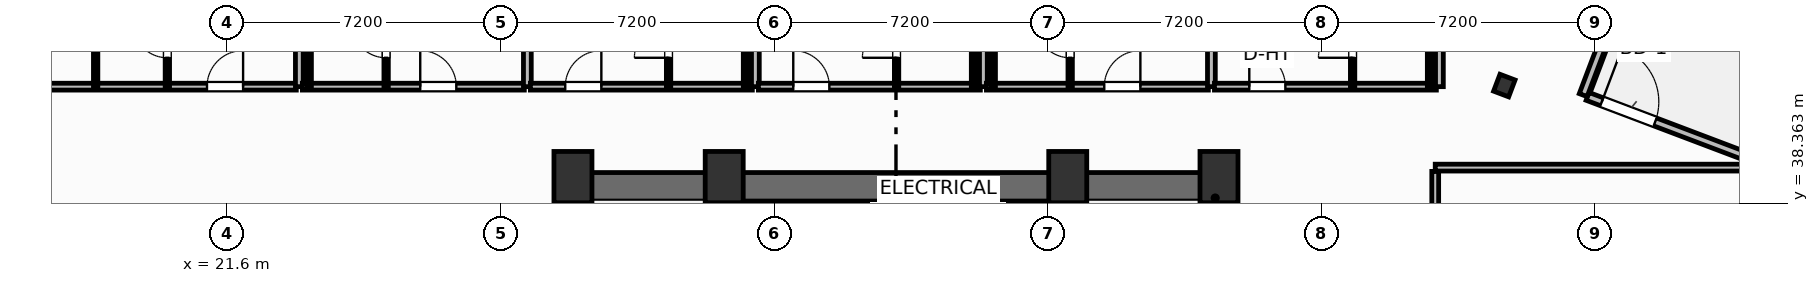
"""IFC4 building model, lengths in metres.
Left out: names, types, materials, properties, quantities, classifications, styles, units other than length and angle.
Written with IfcOpenShell. Run it as: python <this file> out.ifc"""

import sys

from ifc_helpers import new_model, si_unit, direction, frame, frame_2d, origin, origin_2d, place, context, subcontext, project, spatial, rectangle, i_section, extrude, element, fill, save


model = new_model("IFC4")
c1 = context("Model", 3, precision=1e-05, world=origin(), true_north=direction((0.0, 1.0)))
c2 = subcontext(c1, "Body", "Model", "MODEL_VIEW")
j1 = project(units=[si_unit("LENGTHUNIT", "METRE"), si_unit("PLANEANGLEUNIT", "RADIAN")], contexts=[c1])
p1 = place(None, origin())
s1 = spatial("IfcSite", under=j1, at=p1, CompositionType="ELEMENT")
p2 = place(p1, origin())
s2 = spatial("IfcBuilding", under=s1, at=p2, CompositionType="ELEMENT")
p3 = place(p2, frame((0.0, 0.0, 94.7)))
s3 = spatial("IfcBuildingStorey", under=s2, at=p3, CompositionType="ELEMENT", Elevation=94.7)
for number, where, z_axis, x_axis in (
    (1, (30.7, 39.05, 0.0), (0.0, 0.0, 1.0), (1.0, 0.0, 0.0)),
    (2, (34.68, 39.05, 0.0), (0.0, 0.0, 1.0), (1.0, 0.0, 0.0)),
    (3, (43.72, 39.05, 0.0), (0.0, 0.0, 1.0), (1.0, 0.0, 0.0)),
    (4, (47.7, 39.05, 0.0), (0.0, 0.0, 1.0), (1.0, 0.0, 0.0)),
):
    element("IfcColumn", number, at=place(p3, frame(where, z_axis=z_axis, x_axis=x_axis)), inside=s3, PredefinedType="COLUMN", context=c2, shape_type="SweptSolid", body=[
        extrude(rectangle(XDim=1.0, YDim=1.35, at=origin_2d()), origin(), (0.0, 0.0, 1.0), 3.7),
    ])
p4 = place(p3, frame((30.38, 38.795, 0.0), z_axis=(0.0, 0.0, 1.0), x_axis=(1.0, 0.0, 0.0)))
e5 = element("IfcWall", 5, at=p4, inside=s3, PredefinedType="SHEAR", context=c2, shape_type="SweptSolid", body=[
    extrude(rectangle(XDim=17.64, YDim=0.75, at=frame_2d((8.82, 0.0))), origin(), (0.0, 0.0, 1.0), 3.45),
])
for number, where, z_axis, x_axis in (
    (6, (30.755, 29.2, 0.0), (0.0, 0.0, 1.0), (0.0, 1.0, 0.0)),
    (7, (47.645, 29.2, 0.0), (0.0, 0.0, 1.0), (0.0, 1.0, 0.0)),
):
    element("IfcWall", number, at=place(p3, frame(where, z_axis=z_axis, x_axis=x_axis)), inside=s3, PredefinedType="SHEAR", context=c2, shape_type="SweptSolid", body=[
        extrude(rectangle(XDim=9.22, YDim=0.75, at=frame_2d((4.61, 0.0))), origin(), (0.0, 0.0, 1.0), 3.45),
    ])
p5 = place(p3, frame((34.64, 29.2, 0.0), z_axis=(0.0, 0.0, 1.0), x_axis=(0.0, 1.0, 0.0)))
e8 = element("IfcWall", 8, at=p5, inside=s3, PredefinedType="SHEAR", context=c2, shape_type="SweptSolid", body=[
    extrude(rectangle(XDim=9.22, YDim=0.25, at=frame_2d((4.61, 0.0))), origin(), (0.0, 0.0, 1.0), 3.45),
])
p6 = place(p5, frame((0.65, 0.0, 0.0)))
e9 = element("IfcOpeningElement", 9, at=p6, cuts=e8, PredefinedType="OPENING", context=c2, shape_type="SweptSolid", body=[
    extrude(rectangle(XDim=1.05, YDim=2.15, at=frame_2d((0.525, 1.075))), frame((0.0, 0.135, 0.0), z_axis=(0.0, -1.0, 0.0), x_axis=(1.0, 0.0, 0.0)), (0.0, 0.0, 1.0), 0.27),
])
p7 = place(p3, frame((43.76, 29.2, 0.0), z_axis=(0.0, 0.0, 1.0), x_axis=(0.0, 1.0, 0.0)))
e10 = element("IfcWall", 10, at=p7, inside=s3, PredefinedType="SHEAR", context=c2, shape_type="SweptSolid", body=[
    extrude(rectangle(XDim=9.22, YDim=0.25, at=frame_2d((4.61, 0.0))), origin(), (0.0, 0.0, 1.0), 3.45),
])
p8 = place(p7, frame((0.65, 0.0, 0.0)))
e11 = element("IfcOpeningElement", 11, at=p8, cuts=e10, PredefinedType="OPENING", context=c2, shape_type="SweptSolid", body=[
    extrude(rectangle(XDim=1.05, YDim=2.15, at=frame_2d((0.525, 1.075))), frame((0.0, 0.135, 0.0), z_axis=(0.0, -1.0, 0.0), x_axis=(1.0, 0.0, 0.0)), (0.0, 0.0, 1.0), 0.27),
])
p9 = place(p3, frame((55.208, 41.459, 0.0), z_axis=(0.0, 0.0, 1.0), x_axis=(0.935221751401, -0.354062530786, 0.0)))
e12 = element("IfcColumn", 12, at=p9, inside=s3, PredefinedType="COLUMN", context=c2, shape_type="SweptSolid", body=[
    extrude(i_section(OverallWidth=0.424, OverallDepth=0.474, WebThickness=0.048, FlangeThickness=0.077, FilletRadius=0.025, at=origin_2d()), origin(), (0.0, 0.0, 1.0), 3.7),
])
p10 = place(p3, frame((57.399, 41.175, 0.0), z_axis=(0.0, 0.0, 1.0), x_axis=(0.935227640088, -0.354046976001, 0.0)))
e13 = element("IfcWall", 13, at=p10, inside=s3, PredefinedType="SOLIDWALL", context=c2, shape_type="SweptSolid", body=[
    extrude(rectangle(XDim=6.0, YDim=0.22, at=frame_2d((3.0, 0.0))), origin(), (0.0, 0.0, 1.0), 2.73),
])
p11 = place(p10, frame((0.4, 0.0, 0.0)))
e14 = element("IfcOpeningElement", 14, at=p11, cuts=e13, PredefinedType="OPENING", context=c2, shape_type="SweptSolid", body=[
    extrude(rectangle(XDim=1.5, YDim=2.25, at=frame_2d((0.75, 1.125))), frame((0.0, 0.12, 0.0), z_axis=(0.0, -1.0, 0.0), x_axis=(1.0, 0.0, 0.0)), (0.0, 0.0, 1.0), 0.24),
])
p12 = place(p3, frame((57.284, 41.208, 0.0), z_axis=(0.0, 0.0, 1.0), x_axis=(0.354128469405, 0.935196785258, 0.0)))
e15 = element("IfcWall", 15, at=p12, inside=s3, PredefinedType="SOLIDWALL", context=c2, shape_type="SweptSolid", body=[
    extrude(rectangle(XDim=2.1, YDim=0.22, at=frame_2d((1.05, 0.0))), origin(), (0.0, 0.0, 1.0), 2.73),
])
p13 = place(p3, frame((5.506, 41.43, 0.0), z_axis=(0.0, 0.0, 1.0), x_axis=(1.0, 0.0, 0.0)))
e16 = element("IfcWall", 16, at=p13, inside=s3, PredefinedType="PARTITIONING", context=c2, shape_type="SweptSolid", body=[
    extrude(rectangle(XDim=17.914, YDim=0.18, at=frame_2d((8.957, 0.0))), origin(), (0.0, 0.0, 1.0), 3.45),
])
p14 = place(p13, frame((15.564, 0.0, 0.0)))
e17 = element("IfcOpeningElement", 17, at=p14, cuts=e16, PredefinedType="OPENING", context=c2, shape_type="SweptSolid", body=[
    extrude(rectangle(XDim=0.95, YDim=2.15, at=frame_2d((0.475, 1.075))), frame((0.0, 0.1, 0.0), z_axis=(0.0, -1.0, 0.0), x_axis=(1.0, 0.0, 0.0)), (0.0, 0.0, 1.0), 0.2),
])
p15 = place(p3, frame((20.027, 41.43, 0.0), z_axis=(0.0, 0.0, 1.0), x_axis=(0.0, 1.0, 0.0)))
e18 = element("IfcWall", 18, at=p15, inside=s3, PredefinedType="PARTITIONING", context=c2, shape_type="SweptSolid", body=[
    extrude(rectangle(XDim=2.52, YDim=0.115, at=frame_2d((1.26, 0.0))), origin(), (0.0, 0.0, 1.0), 3.45),
])
p16 = place(p15, frame((0.76, 0.0, 0.0)))
e19 = element("IfcOpeningElement", 19, at=p16, cuts=e18, PredefinedType="OPENING", context=c2, shape_type="SweptSolid", body=[
    extrude(rectangle(XDim=0.9, YDim=2.05, at=frame_2d((0.45, 1.025))), frame((0.0, 0.067, 0.0), z_axis=(0.0, -1.0, 0.0), x_axis=(1.0, 0.0, 0.0)), (0.0, 0.0, 1.0), 0.135),
])
p17 = place(p3, frame((18.14, 41.43, 0.0), z_axis=(0.0, 0.0, 1.0), x_axis=(0.0, 1.0, 0.0)))
e20 = element("IfcWall", 20, at=p17, inside=s3, PredefinedType="PARTITIONING", context=c2, shape_type="SweptSolid", body=[
    extrude(rectangle(XDim=2.52, YDim=0.115, at=frame_2d((1.26, 0.0))), origin(), (0.0, 0.0, 1.0), 3.45),
])
p18 = place(p3, frame((23.5, 41.43, 0.0), z_axis=(0.0, 0.0, 1.0), x_axis=(0.0, 1.0, 0.0)))
e21 = element("IfcWall", 21, at=p18, inside=s3, PredefinedType="PARTITIONING", context=c2, shape_type="SweptSolid", body=[
    extrude(rectangle(XDim=14.708, YDim=0.205, at=frame_2d((7.354, 0.0))), origin(), (0.0, 0.0, 1.0), 3.45),
])
p19 = place(p3, frame((23.58, 41.43, 0.0), z_axis=(0.0, 0.0, 1.0), x_axis=(1.0, 0.0, 0.0)))
e22 = element("IfcWall", 22, at=p19, inside=s3, PredefinedType="PARTITIONING", context=c2, shape_type="SweptSolid", body=[
    extrude(rectangle(XDim=5.84, YDim=0.18, at=frame_2d((2.92, 0.0))), origin(), (0.0, 0.0, 1.0), 3.45),
])
p20 = place(p19, frame((3.101, 0.0, 0.0)))
e23 = element("IfcOpeningElement", 23, at=p20, cuts=e22, PredefinedType="OPENING", context=c2, shape_type="SweptSolid", body=[
    extrude(rectangle(XDim=0.95, YDim=2.15, at=frame_2d((0.475, 1.075))), frame((0.0, 0.1, 0.0), z_axis=(0.0, -1.0, 0.0), x_axis=(1.0, 0.0, 0.0)), (0.0, 0.0, 1.0), 0.2),
])
p21 = place(p3, frame((25.784, 41.43, 0.0), z_axis=(0.0, 0.0, 1.0), x_axis=(0.0, 1.0, 0.0)))
e24 = element("IfcWall", 24, at=p21, inside=s3, PredefinedType="PARTITIONING", context=c2, shape_type="SweptSolid", body=[
    extrude(rectangle(XDim=2.52, YDim=0.115, at=frame_2d((1.26, 0.0))), origin(), (0.0, 0.0, 1.0), 3.45),
])
p22 = place(p21, frame((0.76, 0.0, 0.0)))
e25 = element("IfcOpeningElement", 25, at=p22, cuts=e24, PredefinedType="OPENING", context=c2, shape_type="SweptSolid", body=[
    extrude(rectangle(XDim=0.9, YDim=2.05, at=frame_2d((0.45, 1.025))), frame((0.0, 0.067, 0.0), z_axis=(0.0, -1.0, 0.0), x_axis=(1.0, 0.0, 0.0)), (0.0, 0.0, 1.0), 0.135),
])
p23 = place(p3, frame((23.76, 41.43, 0.0), z_axis=(0.0, 0.0, 1.0), x_axis=(0.0, 1.0, 0.0)))
e26 = element("IfcWall", 26, at=p23, inside=s3, PredefinedType="PARTITIONING", context=c2, shape_type="SweptSolid", body=[
    extrude(rectangle(XDim=2.52, YDim=0.115, at=frame_2d((1.26, 0.0))), origin(), (0.0, 0.0, 1.0), 3.45),
])
p24 = place(p3, frame((29.5, 41.43, 0.0), z_axis=(0.0, 0.0, 1.0), x_axis=(0.0, 1.0, 0.0)))
e27 = element("IfcWall", 27, at=p24, inside=s3, PredefinedType="PARTITIONING", context=c2, shape_type="SweptSolid", body=[
    extrude(rectangle(XDim=12.52, YDim=0.205, at=frame_2d((6.26, 0.0))), origin(), (0.0, 0.0, 1.0), 2.58),
])
p25 = place(p3, frame((29.58, 41.43, 0.0), z_axis=(0.0, 0.0, 1.0), x_axis=(1.0, 0.0, 0.0)))
e28 = element("IfcWall", 28, at=p25, inside=s3, PredefinedType="PARTITIONING", context=c2, shape_type="SweptSolid", body=[
    extrude(rectangle(XDim=5.84, YDim=0.18, at=frame_2d((2.92, 0.0))), origin(), (0.0, 0.0, 1.0), 3.45),
])
p26 = place(p25, frame((0.917, 0.0, 0.0)))
e29 = element("IfcOpeningElement", 29, at=p26, cuts=e28, PredefinedType="OPENING", context=c2, shape_type="SweptSolid", body=[
    extrude(rectangle(XDim=0.95, YDim=2.15, at=frame_2d((0.475, 1.075))), frame((0.0, 0.1, 0.0), z_axis=(0.0, -1.0, 0.0), x_axis=(1.0, 0.0, 0.0)), (0.0, 0.0, 1.0), 0.2),
])
p27 = place(p3, frame((33.216, 41.43, 0.0), z_axis=(0.0, 0.0, 1.0), x_axis=(0.0, 1.0, 0.0)))
e30 = element("IfcWall", 30, at=p27, inside=s3, PredefinedType="PARTITIONING", context=c2, shape_type="SweptSolid", body=[
    extrude(rectangle(XDim=2.52, YDim=0.115, at=frame_2d((1.26, 0.0))), origin(), (0.0, 0.0, 1.0), 3.45),
])
p28 = place(p27, frame((0.76, 0.0, 0.0)))
e31 = element("IfcOpeningElement", 31, at=p28, cuts=e30, PredefinedType="OPENING", context=c2, shape_type="SweptSolid", body=[
    extrude(rectangle(XDim=0.9, YDim=2.05, at=frame_2d((0.45, 1.025))), frame((0.0, 0.067, 0.0), z_axis=(0.0, -1.0, 0.0), x_axis=(1.0, 0.0, 0.0)), (0.0, 0.0, 1.0), 0.135),
])
p29 = place(p3, frame((35.24, 41.43, 0.0), z_axis=(0.0, 0.0, 1.0), x_axis=(0.0, 1.0, 0.0)))
e32 = element("IfcWall", 32, at=p29, inside=s3, PredefinedType="PARTITIONING", context=c2, shape_type="SweptSolid", body=[
    extrude(rectangle(XDim=2.52, YDim=0.115, at=frame_2d((1.26, 0.0))), origin(), (0.0, 0.0, 1.0), 3.45),
])
p30 = place(p3, frame((35.5, 41.43, 0.0), z_axis=(0.0, 0.0, 1.0), x_axis=(0.0, 1.0, 0.0)))
e33 = element("IfcWall", 33, at=p30, inside=s3, PredefinedType="PARTITIONING", context=c2, shape_type="SweptSolid", body=[
    extrude(rectangle(XDim=8.003, YDim=0.205, at=frame_2d((4.002, 0.0))), origin(), (0.0, 0.0, 1.0), 3.45),
])
p31 = place(p3, frame((35.58, 41.43, 0.0), z_axis=(0.0, 0.0, 1.0), x_axis=(1.0, 0.0, 0.0)))
e34 = element("IfcWall", 34, at=p31, inside=s3, PredefinedType="PARTITIONING", context=c2, shape_type="SweptSolid", body=[
    extrude(rectangle(XDim=5.84, YDim=0.18, at=frame_2d((2.92, 0.0))), origin(), (0.0, 0.0, 1.0), 3.45),
])
p32 = place(p31, frame((0.917, 0.0, 0.0)))
e35 = element("IfcOpeningElement", 35, at=p32, cuts=e34, PredefinedType="OPENING", context=c2, shape_type="SweptSolid", body=[
    extrude(rectangle(XDim=0.95, YDim=2.15, at=frame_2d((0.475, 1.075))), frame((0.0, 0.1, 0.0), z_axis=(0.0, -1.0, 0.0), x_axis=(1.0, 0.0, 0.0)), (0.0, 0.0, 1.0), 0.2),
])
p33 = place(p3, frame((39.216, 41.43, 0.0), z_axis=(0.0, 0.0, 1.0), x_axis=(0.0, 1.0, 0.0)))
e36 = element("IfcWall", 36, at=p33, inside=s3, PredefinedType="PARTITIONING", context=c2, shape_type="SweptSolid", body=[
    extrude(rectangle(XDim=2.52, YDim=0.115, at=frame_2d((1.26, 0.0))), origin(), (0.0, 0.0, 1.0), 3.45),
])
p34 = place(p33, frame((0.76, 0.0, 0.0)))
e37 = element("IfcOpeningElement", 37, at=p34, cuts=e36, PredefinedType="OPENING", context=c2, shape_type="SweptSolid", body=[
    extrude(rectangle(XDim=0.9, YDim=2.05, at=frame_2d((0.45, 1.025))), frame((0.0, 0.067, 0.0), z_axis=(0.0, -1.0, 0.0), x_axis=(1.0, 0.0, 0.0)), (0.0, 0.0, 1.0), 0.135),
])
p35 = place(p3, frame((41.24, 41.43, 0.0), z_axis=(0.0, 0.0, 1.0), x_axis=(0.0, 1.0, 0.0)))
e38 = element("IfcWall", 38, at=p35, inside=s3, PredefinedType="PARTITIONING", context=c2, shape_type="SweptSolid", body=[
    extrude(rectangle(XDim=2.52, YDim=0.115, at=frame_2d((1.26, 0.0))), origin(), (0.0, 0.0, 1.0), 3.45),
])
p36 = place(p3, frame((41.5, 41.43, 0.0), z_axis=(0.0, 0.0, 1.0), x_axis=(0.0, 1.0, 0.0)))
e39 = element("IfcWall", 39, at=p36, inside=s3, PredefinedType="PARTITIONING", context=c2, shape_type="SweptSolid", body=[
    extrude(rectangle(XDim=7.977, YDim=0.205, at=frame_2d((3.989, 0.0))), origin(), (0.0, 0.0, 1.0), 3.45),
])
p37 = place(p3, frame((41.58, 41.43, 0.0), z_axis=(0.0, 0.0, 1.0), x_axis=(1.0, 0.0, 0.0)))
e40 = element("IfcWall", 40, at=p37, inside=s3, PredefinedType="PARTITIONING", context=c2, shape_type="SweptSolid", body=[
    extrude(rectangle(XDim=5.84, YDim=0.18, at=frame_2d((2.92, 0.0))), origin(), (0.0, 0.0, 1.0), 3.45),
])
p38 = place(p37, frame((3.101, 0.0, 0.0)))
e41 = element("IfcOpeningElement", 41, at=p38, cuts=e40, PredefinedType="OPENING", context=c2, shape_type="SweptSolid", body=[
    extrude(rectangle(XDim=0.95, YDim=2.15, at=frame_2d((0.475, 1.075))), frame((0.0, 0.1, 0.0), z_axis=(0.0, -1.0, 0.0), x_axis=(1.0, 0.0, 0.0)), (0.0, 0.0, 1.0), 0.2),
])
p39 = place(p3, frame((43.784, 41.43, 0.0), z_axis=(0.0, 0.0, 1.0), x_axis=(0.0, 1.0, 0.0)))
e42 = element("IfcWall", 42, at=p39, inside=s3, PredefinedType="PARTITIONING", context=c2, shape_type="SweptSolid", body=[
    extrude(rectangle(XDim=2.52, YDim=0.115, at=frame_2d((1.26, 0.0))), origin(), (0.0, 0.0, 1.0), 3.45),
])
p40 = place(p39, frame((0.76, 0.0, 0.0)))
e43 = element("IfcOpeningElement", 43, at=p40, cuts=e42, PredefinedType="OPENING", context=c2, shape_type="SweptSolid", body=[
    extrude(rectangle(XDim=0.9, YDim=2.05, at=frame_2d((0.45, 1.025))), frame((0.0, 0.067, 0.0), z_axis=(0.0, -1.0, 0.0), x_axis=(1.0, 0.0, 0.0)), (0.0, 0.0, 1.0), 0.135),
])
p41 = place(p3, frame((41.76, 41.43, 0.0), z_axis=(0.0, 0.0, 1.0), x_axis=(0.0, 1.0, 0.0)))
e44 = element("IfcWall", 44, at=p41, inside=s3, PredefinedType="PARTITIONING", context=c2, shape_type="SweptSolid", body=[
    extrude(rectangle(XDim=2.52, YDim=0.115, at=frame_2d((1.26, 0.0))), origin(), (0.0, 0.0, 1.0), 3.45),
])
p42 = place(p3, frame((47.5, 41.43, 0.0), z_axis=(0.0, 0.0, 1.0), x_axis=(0.0, 1.0, 0.0)))
e45 = element("IfcWall", 45, at=p42, inside=s3, PredefinedType="PARTITIONING", context=c2, shape_type="SweptSolid", body=[
    extrude(rectangle(XDim=3.46, YDim=0.205, at=frame_2d((1.73, 0.0))), origin(), (0.0, 0.0, 1.0), 3.45),
])
p43 = place(p3, frame((47.58, 41.43, 0.0), z_axis=(0.0, 0.0, 1.0), x_axis=(1.0, 0.0, 0.0)))
e46 = element("IfcWall", 46, at=p43, inside=s3, PredefinedType="PARTITIONING", context=c2, shape_type="SweptSolid", body=[
    extrude(rectangle(XDim=5.84, YDim=0.18, at=frame_2d((2.92, 0.0))), origin(), (0.0, 0.0, 1.0), 3.45),
])
p44 = place(p43, frame((0.917, 0.0, 0.0)))
e47 = element("IfcOpeningElement", 47, at=p44, cuts=e46, PredefinedType="OPENING", context=c2, shape_type="SweptSolid", body=[
    extrude(rectangle(XDim=0.95, YDim=2.15, at=frame_2d((0.475, 1.075))), frame((0.0, 0.1, 0.0), z_axis=(0.0, -1.0, 0.0), x_axis=(1.0, 0.0, 0.0)), (0.0, 0.0, 1.0), 0.2),
])
p45 = place(p3, frame((51.216, 41.43, 0.0), z_axis=(0.0, 0.0, 1.0), x_axis=(0.0, 1.0, 0.0)))
e48 = element("IfcWall", 48, at=p45, inside=s3, PredefinedType="PARTITIONING", context=c2, shape_type="SweptSolid", body=[
    extrude(rectangle(XDim=2.52, YDim=0.115, at=frame_2d((1.26, 0.0))), origin(), (0.0, 0.0, 1.0), 3.45),
])
p46 = place(p45, frame((0.76, 0.0, 0.0)))
e49 = element("IfcOpeningElement", 49, at=p46, cuts=e48, PredefinedType="OPENING", context=c2, shape_type="SweptSolid", body=[
    extrude(rectangle(XDim=0.9, YDim=2.05, at=frame_2d((0.45, 1.025))), frame((0.0, 0.067, 0.0), z_axis=(0.0, -1.0, 0.0), x_axis=(1.0, 0.0, 0.0)), (0.0, 0.0, 1.0), 0.135),
])
p47 = place(p3, frame((53.24, 41.43, 0.0), z_axis=(0.0, 0.0, 1.0), x_axis=(0.0, 1.0, 0.0)))
e50 = element("IfcWall", 50, at=p47, inside=s3, PredefinedType="PARTITIONING", context=c2, shape_type="SweptSolid", body=[
    extrude(rectangle(XDim=2.52, YDim=0.115, at=frame_2d((1.26, 0.0))), origin(), (0.0, 0.0, 1.0), 3.45),
])
p48 = place(p3, frame((53.5, 41.43, 0.0), z_axis=(0.0, 0.0, 1.0), x_axis=(0.0, 1.0, 0.0)))
e51 = element("IfcWall", 51, at=p48, inside=s3, PredefinedType="PARTITIONING", context=c2, shape_type="SweptSolid", body=[
    extrude(rectangle(XDim=3.434, YDim=0.205, at=frame_2d((1.717, 0.0))), origin(), (0.0, 0.0, 1.0), 3.45),
])
p49 = place(p3, frame((53.39, 27.53, 0.0), z_axis=(0.0, 0.0, 1.0), x_axis=(0.0, 1.0, 0.0)))
e52 = element("IfcWall", 52, at=p49, inside=s3, PredefinedType="PARTITIONING", context=c2, shape_type="SweptSolid", body=[
    extrude(rectangle(XDim=11.67, YDim=0.18, at=frame_2d((5.835, 0.0))), origin(), (0.0, 0.0, 1.0), 3.45),
])
p50 = place(p49, frame((5.8, 0.0, 0.0)))
e53 = element("IfcOpeningElement", 53, at=p50, cuts=e52, PredefinedType="OPENING", context=c2, shape_type="SweptSolid", body=[
    extrude(rectangle(XDim=0.92, YDim=2.05, at=frame_2d((0.46, 1.025))), frame((0.0, 0.1, 0.0), z_axis=(0.0, -1.0, 0.0), x_axis=(1.0, 0.0, 0.0)), (0.0, 0.0, 1.0), 0.2),
])
p51 = place(p3, frame((53.39, 39.3, 0.0), z_axis=(0.0, 0.0, 1.0), x_axis=(1.0, 0.0, 0.0)))
e54 = element("IfcWall", 54, at=p51, inside=s3, PredefinedType="PARTITIONING", context=c2, shape_type="SweptSolid", body=[
    extrude(rectangle(XDim=8.876, YDim=0.18, at=frame_2d((4.438, 0.0))), origin(), (0.0, 0.0, 1.0), 3.45),
])
p52 = place(p11, origin())
e55 = element("IfcDoor", 55, at=p52, inside=s3, OperationType="SINGLE_SWING_LEFT", PredefinedType="DOOR", context=c2, shape_type="SweptSolid", body=[
    extrude(rectangle(XDim=1.5, YDim=2.25, at=frame_2d((0.75, 1.125))), frame((0.0, 0.025, 0.0), z_axis=(0.0, -1.0, 0.0), x_axis=(1.0, 0.0, 0.0)), (0.0, 0.0, 1.0), 0.05),
])
fill(e14, e55)
p53 = place(p14, origin())
e56 = element("IfcDoor", 56, at=p53, inside=s3, OperationType="SINGLE_SWING_RIGHT", PredefinedType="DOOR", context=c2, shape_type="SweptSolid", body=[
    extrude(rectangle(XDim=0.95, YDim=2.15, at=frame_2d((0.475, 1.075))), frame((0.0, 0.025, 0.0), z_axis=(0.0, -1.0, 0.0), x_axis=(1.0, 0.0, 0.0)), (0.0, 0.0, 1.0), 0.05),
])
fill(e17, e56)
p54 = place(p16, origin())
e57 = element("IfcDoor", 57, at=p54, inside=s3, OperationType="SINGLE_SWING_RIGHT", PredefinedType="DOOR", context=c2, shape_type="SweptSolid", body=[
    extrude(rectangle(XDim=0.9, YDim=2.05, at=frame_2d((0.45, 1.025))), frame((0.0, 0.025, 0.0), z_axis=(0.0, -1.0, 0.0), x_axis=(1.0, 0.0, 0.0)), (0.0, 0.0, 1.0), 0.05),
])
fill(e19, e57)
p55 = place(p20, origin())
e58 = element("IfcDoor", 58, at=p55, inside=s3, OperationType="SINGLE_SWING_LEFT", PredefinedType="DOOR", context=c2, shape_type="SweptSolid", body=[
    extrude(rectangle(XDim=0.95, YDim=2.15, at=frame_2d((0.475, 1.075))), frame((0.0, 0.025, 0.0), z_axis=(0.0, -1.0, 0.0), x_axis=(1.0, 0.0, 0.0)), (0.0, 0.0, 1.0), 0.05),
])
fill(e23, e58)
p56 = place(p22, origin())
e59 = element("IfcDoor", 59, at=p56, inside=s3, OperationType="SINGLE_SWING_RIGHT", PredefinedType="DOOR", context=c2, shape_type="SweptSolid", body=[
    extrude(rectangle(XDim=0.9, YDim=2.05, at=frame_2d((0.45, 1.025))), frame((0.0, 0.025, 0.0), z_axis=(0.0, -1.0, 0.0), x_axis=(1.0, 0.0, 0.0)), (0.0, 0.0, 1.0), 0.05),
])
fill(e25, e59)
p57 = place(p26, origin())
e60 = element("IfcDoor", 60, at=p57, inside=s3, OperationType="SINGLE_SWING_RIGHT", PredefinedType="DOOR", context=c2, shape_type="SweptSolid", body=[
    extrude(rectangle(XDim=0.95, YDim=2.15, at=frame_2d((0.475, 1.075))), frame((0.0, 0.025, 0.0), z_axis=(0.0, -1.0, 0.0), x_axis=(1.0, 0.0, 0.0)), (0.0, 0.0, 1.0), 0.05),
])
fill(e29, e60)
p58 = place(p28, origin())
e61 = element("IfcDoor", 61, at=p58, inside=s3, OperationType="SINGLE_SWING_LEFT", PredefinedType="DOOR", context=c2, shape_type="SweptSolid", body=[
    extrude(rectangle(XDim=0.9, YDim=2.05, at=frame_2d((0.45, 1.025))), frame((0.0, 0.025, 0.0), z_axis=(0.0, -1.0, 0.0), x_axis=(1.0, 0.0, 0.0)), (0.0, 0.0, 1.0), 0.05),
])
fill(e31, e61)
p59 = place(p32, origin())
e62 = element("IfcDoor", 62, at=p59, inside=s3, OperationType="SINGLE_SWING_LEFT", PredefinedType="DOOR", context=c2, shape_type="SweptSolid", body=[
    extrude(rectangle(XDim=0.95, YDim=2.15, at=frame_2d((0.475, 1.075))), frame((0.0, 0.025, 0.0), z_axis=(0.0, -1.0, 0.0), x_axis=(1.0, 0.0, 0.0)), (0.0, 0.0, 1.0), 0.05),
])
fill(e35, e62)
p60 = place(p34, origin())
e63 = element("IfcDoor", 63, at=p60, inside=s3, OperationType="SINGLE_SWING_LEFT", PredefinedType="DOOR", context=c2, shape_type="SweptSolid", body=[
    extrude(rectangle(XDim=0.9, YDim=2.05, at=frame_2d((0.45, 1.025))), frame((0.0, 0.025, 0.0), z_axis=(0.0, -1.0, 0.0), x_axis=(1.0, 0.0, 0.0)), (0.0, 0.0, 1.0), 0.05),
])
fill(e37, e63)
p61 = place(p38, origin())
e64 = element("IfcDoor", 64, at=p61, inside=s3, OperationType="SINGLE_SWING_RIGHT", PredefinedType="DOOR", context=c2, shape_type="SweptSolid", body=[
    extrude(rectangle(XDim=0.95, YDim=2.15, at=frame_2d((0.475, 1.075))), frame((0.0, 0.025, 0.0), z_axis=(0.0, -1.0, 0.0), x_axis=(1.0, 0.0, 0.0)), (0.0, 0.0, 1.0), 0.05),
])
fill(e41, e64)
p62 = place(p40, origin())
e65 = element("IfcDoor", 65, at=p62, inside=s3, OperationType="SINGLE_SWING_RIGHT", PredefinedType="DOOR", context=c2, shape_type="SweptSolid", body=[
    extrude(rectangle(XDim=0.9, YDim=2.05, at=frame_2d((0.45, 1.025))), frame((0.0, 0.025, 0.0), z_axis=(0.0, -1.0, 0.0), x_axis=(1.0, 0.0, 0.0)), (0.0, 0.0, 1.0), 0.05),
])
fill(e43, e65)
p63 = place(p44, origin())
e66 = element("IfcDoor", 66, at=p63, inside=s3, OperationType="SINGLE_SWING_LEFT", PredefinedType="DOOR", context=c2, shape_type="SweptSolid", body=[
    extrude(rectangle(XDim=0.95, YDim=2.15, at=frame_2d((0.475, 1.075))), frame((0.0, 0.025, 0.0), z_axis=(0.0, -1.0, 0.0), x_axis=(1.0, 0.0, 0.0)), (0.0, 0.0, 1.0), 0.05),
])
fill(e47, e66)
p64 = place(p46, origin())
e67 = element("IfcDoor", 67, at=p64, inside=s3, OperationType="SINGLE_SWING_LEFT", PredefinedType="DOOR", context=c2, shape_type="SweptSolid", body=[
    extrude(rectangle(XDim=0.9, YDim=2.05, at=frame_2d((0.45, 1.025))), frame((0.0, 0.025, 0.0), z_axis=(0.0, -1.0, 0.0), x_axis=(1.0, 0.0, 0.0)), (0.0, 0.0, 1.0), 0.05),
])
fill(e49, e67)
save(model, sys.argv[1])
